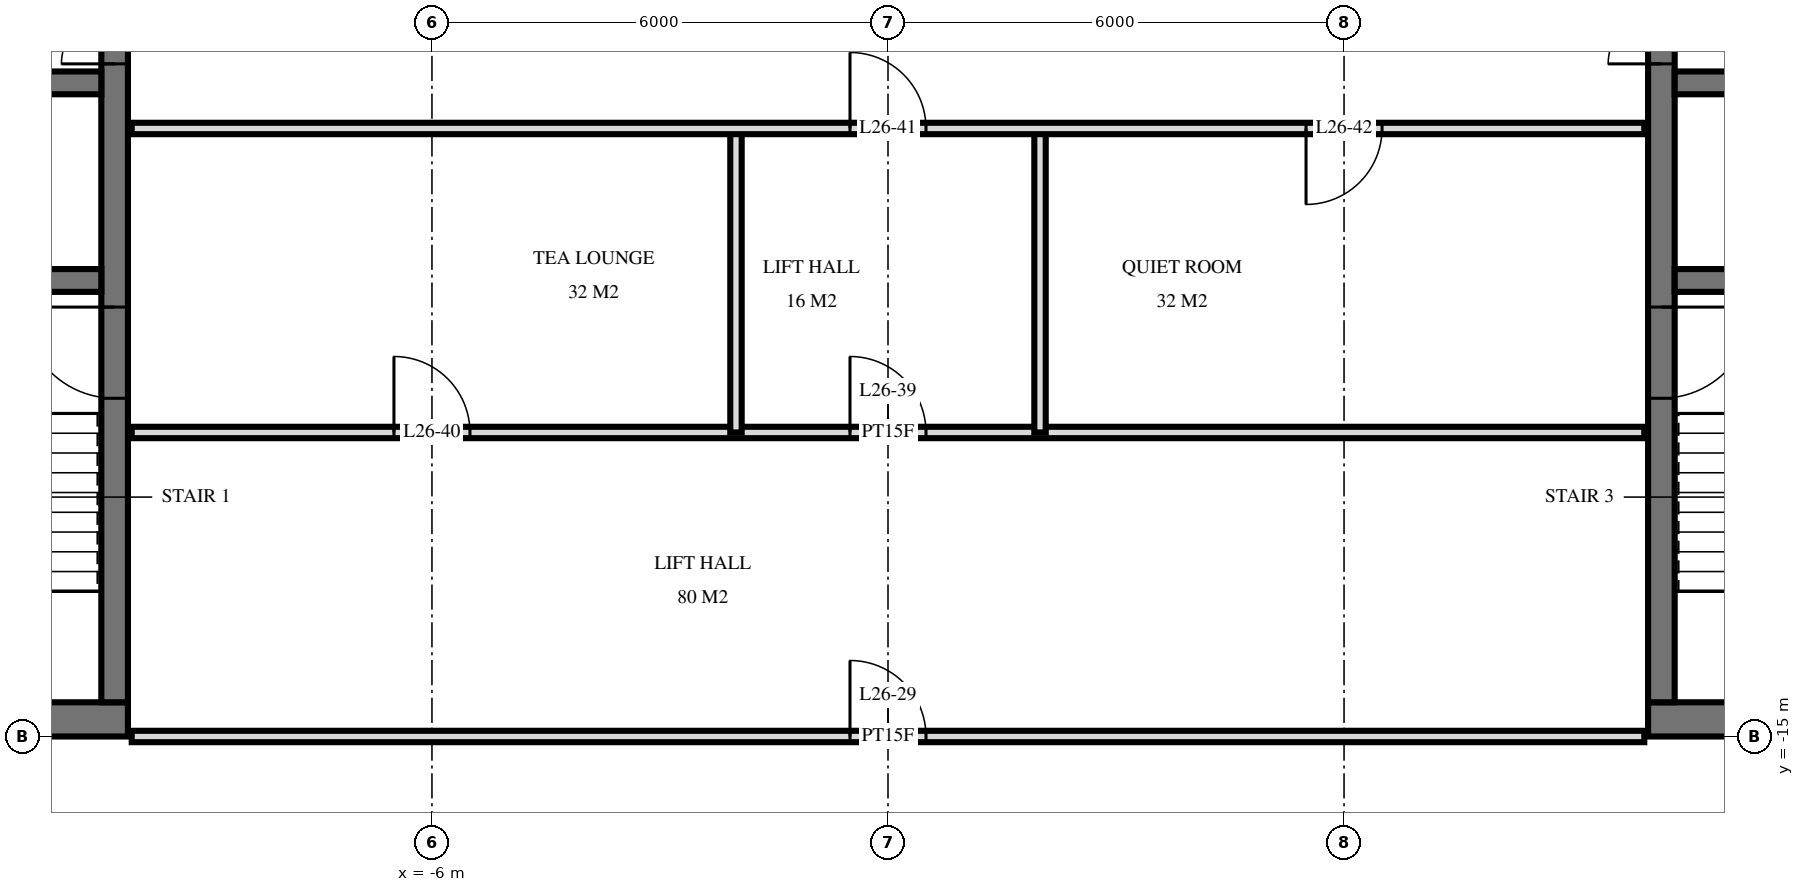
"""IFC4 building model, lengths in metres.
Left out: names, types, materials, properties, quantities, classifications, styles, units other than length and angle.
Written with IfcOpenShell. Run it as: python <this file> out.ifc"""

import sys

from ifc_helpers import new_model, si_unit, direction, frame, frame_2d, origin, place, context, subcontext, project, spatial, rectangle, extrude, element, fill, save


model = new_model("IFC4")
c1 = context("Model", 3, precision=1e-05, world=origin(), true_north=direction((0.0, 1.0)))
c2 = subcontext(c1, "Body", "Model", "MODEL_VIEW")
j1 = project(units=[si_unit("LENGTHUNIT", "METRE"), si_unit("PLANEANGLEUNIT", "RADIAN")], contexts=[c1])
p1 = place(None, origin())
s1 = spatial("IfcSite", under=j1, at=p1, CompositionType="ELEMENT")
p2 = place(p1, origin())
s2 = spatial("IfcBuilding", under=s1, at=p2, CompositionType="ELEMENT")
p3 = place(p2, frame((0.0, 0.0, 103.2)))
s3 = spatial("IfcBuildingStorey", under=s2, at=p3, CompositionType="ELEMENT", Elevation=103.2)
p4 = place(p3, frame((-29.5, -14.775, 0.0), z_axis=(0.0, 0.0, 1.0), x_axis=(1.0, 0.0, 0.0)))
e1 = element("IfcWall", 1, at=p4, inside=s3, PredefinedType="SHEAR", context=c2, shape_type="SweptSolid", body=[
    extrude(rectangle(XDim=19.5, YDim=0.45, at=frame_2d((9.75, 0.0))), origin(), (0.0, 0.0, 1.0), 3.6),
])
p5 = place(p4, frame((11.2, 0.0, 0.0)))
e2 = element("IfcOpeningElement", 2, at=p5, cuts=e1, PredefinedType="OPENING", context=c2, shape_type="SweptSolid", body=[
    extrude(rectangle(XDim=1.2, YDim=2.1, at=frame_2d((0.6, 1.05))), frame((0.0, 0.235, 0.0), z_axis=(0.0, -1.0, 0.0), x_axis=(1.0, 0.0, 0.0)), (0.0, 0.0, 1.0), 0.47),
])
p6 = place(p4, frame((14.25, 0.0, 0.0)))
e3 = element("IfcOpeningElement", 3, at=p6, cuts=e1, PredefinedType="OPENING", context=c2, shape_type="SweptSolid", body=[
    extrude(rectangle(XDim=1.1, YDim=2.1, at=frame_2d((0.55, 1.05))), frame((0.0, 0.235, 0.0), z_axis=(0.0, -1.0, 0.0), x_axis=(1.0, 0.0, 0.0)), (0.0, 0.0, 1.0), 0.47),
])
p7 = place(p4, frame((8.5, 0.0, 0.0)))
e4 = element("IfcOpeningElement", 4, at=p7, cuts=e1, PredefinedType="OPENING", context=c2, shape_type="SweptSolid", body=[
    extrude(rectangle(XDim=0.9, YDim=2.1, at=frame_2d((0.45, 1.05))), frame((0.0, 0.235, 0.0), z_axis=(0.0, -1.0, 0.0), x_axis=(1.0, 0.0, 0.0)), (0.0, 0.0, 1.0), 0.47),
])
p8 = place(p4, frame((6.05, 0.0, 0.0)))
e5 = element("IfcOpeningElement", 5, at=p8, cuts=e1, PredefinedType="OPENING", context=c2, shape_type="SweptSolid", body=[
    extrude(rectangle(XDim=1.0, YDim=2.1, at=frame_2d((0.5, 1.05))), frame((0.0, 0.235, 0.0), z_axis=(0.0, -1.0, 0.0), x_axis=(1.0, 0.0, 0.0)), (0.0, 0.0, 1.0), 0.47),
])
p9 = place(p4, frame((3.413, 0.0, 0.0)))
e6 = element("IfcOpeningElement", 6, at=p9, cuts=e1, PredefinedType="OPENING", context=c2, shape_type="SweptSolid", body=[
    extrude(rectangle(XDim=1.0, YDim=2.1, at=frame_2d((0.5, 1.05))), frame((0.0, 0.235, 0.0), z_axis=(0.0, -1.0, 0.0), x_axis=(1.0, 0.0, 0.0)), (0.0, 0.0, 1.0), 0.47),
])
p10 = place(p4, frame((1.087, 0.0, 0.0)))
e7 = element("IfcOpeningElement", 7, at=p10, cuts=e1, PredefinedType="OPENING", context=c2, shape_type="SweptSolid", body=[
    extrude(rectangle(XDim=1.0, YDim=2.1, at=frame_2d((0.5, 1.05))), frame((0.0, 0.235, 0.0), z_axis=(0.0, -1.0, 0.0), x_axis=(1.0, 0.0, 0.0)), (0.0, 0.0, 1.0), 0.47),
])
p11 = place(p3, frame((-10.175, -14.55, 0.0), z_axis=(0.0, 0.0, 1.0), x_axis=(0.0, 1.0, 0.0)))
e8 = element("IfcWall", 8, at=p11, inside=s3, PredefinedType="SHEAR", context=c2, shape_type="SweptSolid", body=[
    extrude(rectangle(XDim=14.1, YDim=0.35, at=frame_2d((7.05, 0.0))), origin(), (0.0, 0.0, 1.0), 3.6),
])
p12 = place(p11, frame((8.4, 0.0, 0.0)))
e9 = element("IfcOpeningElement", 9, at=p12, cuts=e8, PredefinedType="OPENING", context=c2, shape_type="SweptSolid", body=[
    extrude(rectangle(XDim=1.4, YDim=2.4, at=frame_2d((0.7, 1.2))), frame((0.0, 0.185, 0.0), z_axis=(0.0, -1.0, 0.0), x_axis=(1.0, 0.0, 0.0)), (0.0, 0.0, 1.0), 0.37),
])
p13 = place(p11, frame((10.0, 0.0, 0.0)))
e10 = element("IfcOpeningElement", 10, at=p13, cuts=e8, PredefinedType="OPENING", context=c2, shape_type="SweptSolid", body=[
    extrude(rectangle(XDim=1.4, YDim=2.4, at=frame_2d((0.7, 1.2))), frame((0.0, 0.185, 0.0), z_axis=(0.0, -1.0, 0.0), x_axis=(1.0, 0.0, 0.0)), (0.0, 0.0, 1.0), 0.37),
])
p14 = place(p11, frame((4.0, 0.0, 0.0)))
e11 = element("IfcOpeningElement", 11, at=p14, cuts=e8, PredefinedType="OPENING", context=c2, shape_type="SweptSolid", body=[
    extrude(rectangle(XDim=1.2, YDim=2.1, at=frame_2d((0.6, 1.05))), frame((0.0, 0.185, 0.0), z_axis=(0.0, -1.0, 0.0), x_axis=(1.0, 0.0, 0.0)), (0.0, 0.0, 1.0), 0.37),
])
p15 = place(p3, frame((-29.05, -6.4, 0.0), z_axis=(0.0, 0.0, 1.0), x_axis=(1.0, 0.0, 0.0)))
e12 = element("IfcWall", 12, at=p15, inside=s3, PredefinedType="SHEAR", context=c2, shape_type="SweptSolid", body=[
    extrude(rectangle(XDim=18.7, YDim=0.3, at=frame_2d((9.35, 0.0))), origin(), (0.0, 0.0, 1.0), 3.6),
])
p16 = place(p15, frame((2.95, 0.0, 0.0)))
e13 = element("IfcOpeningElement", 13, at=p16, cuts=e12, PredefinedType="OPENING", context=c2, shape_type="SweptSolid", body=[
    extrude(rectangle(XDim=1.1, YDim=2.1, at=frame_2d((0.55, 1.05))), frame((0.0, 0.16, 0.0), z_axis=(0.0, -1.0, 0.0), x_axis=(1.0, 0.0, 0.0)), (0.0, 0.0, 1.0), 0.32),
])
p17 = place(p15, frame((0.55, 0.0, 0.0)))
e14 = element("IfcOpeningElement", 14, at=p17, cuts=e12, PredefinedType="OPENING", context=c2, shape_type="SweptSolid", body=[
    extrude(rectangle(XDim=1.1, YDim=2.1, at=frame_2d((0.55, 1.05))), frame((0.0, 0.16, 0.0), z_axis=(0.0, -1.0, 0.0), x_axis=(1.0, 0.0, 0.0)), (0.0, 0.0, 1.0), 0.32),
])
p18 = place(p15, frame((10.8, 0.0, 0.0)))
e15 = element("IfcOpeningElement", 15, at=p18, cuts=e12, PredefinedType="OPENING", context=c2, shape_type="SweptSolid", body=[
    extrude(rectangle(XDim=1.1, YDim=2.1, at=frame_2d((0.55, 1.05))), frame((0.0, 0.16, 0.0), z_axis=(0.0, -1.0, 0.0), x_axis=(1.0, 0.0, 0.0)), (0.0, 0.0, 1.0), 0.32),
])
p19 = place(p3, frame((-29.05, -9.0, 0.0), z_axis=(0.0, 0.0, 1.0), x_axis=(1.0, 0.0, 0.0)))
e16 = element("IfcWall", 16, at=p19, inside=s3, PredefinedType="SHEAR", context=c2, shape_type="SweptSolid", body=[
    extrude(rectangle(XDim=18.7, YDim=0.3, at=frame_2d((9.35, 0.0))), origin(), (0.0, 0.0, 1.0), 3.6),
])
p20 = place(p19, frame((13.8, 0.0, 0.0)))
e17 = element("IfcOpeningElement", 17, at=p20, cuts=e16, PredefinedType="OPENING", context=c2, shape_type="SweptSolid", body=[
    extrude(rectangle(XDim=1.1, YDim=2.1, at=frame_2d((0.55, 1.05))), frame((0.0, 0.16, 0.0), z_axis=(0.0, -1.0, 0.0), x_axis=(1.0, 0.0, 0.0)), (0.0, 0.0, 1.0), 0.32),
])
p21 = place(p3, frame((10.0, -14.775, 0.0), z_axis=(0.0, 0.0, 1.0), x_axis=(1.0, 0.0, 0.0)))
e18 = element("IfcWall", 18, at=p21, inside=s3, PredefinedType="SHEAR", context=c2, shape_type="SweptSolid", body=[
    extrude(rectangle(XDim=19.5, YDim=0.45, at=frame_2d((9.75, 0.0))), origin(), (0.0, 0.0, 1.0), 3.6),
])
p22 = place(p21, frame((7.1, 0.0, 0.0)))
e19 = element("IfcOpeningElement", 19, at=p22, cuts=e18, PredefinedType="OPENING", context=c2, shape_type="SweptSolid", body=[
    extrude(rectangle(XDim=1.2, YDim=2.1, at=frame_2d((0.6, 1.05))), frame((0.0, 0.235, 0.0), z_axis=(0.0, -1.0, 0.0), x_axis=(1.0, 0.0, 0.0)), (0.0, 0.0, 1.0), 0.47),
])
p23 = place(p21, frame((4.15, 0.0, 0.0)))
e20 = element("IfcOpeningElement", 20, at=p23, cuts=e18, PredefinedType="OPENING", context=c2, shape_type="SweptSolid", body=[
    extrude(rectangle(XDim=1.1, YDim=2.1, at=frame_2d((0.55, 1.05))), frame((0.0, 0.235, 0.0), z_axis=(0.0, -1.0, 0.0), x_axis=(1.0, 0.0, 0.0)), (0.0, 0.0, 1.0), 0.47),
])
p24 = place(p21, frame((10.1, 0.0, 0.0)))
e21 = element("IfcOpeningElement", 21, at=p24, cuts=e18, PredefinedType="OPENING", context=c2, shape_type="SweptSolid", body=[
    extrude(rectangle(XDim=0.9, YDim=2.1, at=frame_2d((0.45, 1.05))), frame((0.0, 0.235, 0.0), z_axis=(0.0, -1.0, 0.0), x_axis=(1.0, 0.0, 0.0)), (0.0, 0.0, 1.0), 0.47),
])
p25 = place(p21, frame((12.45, 0.0, 0.0)))
e22 = element("IfcOpeningElement", 22, at=p25, cuts=e18, PredefinedType="OPENING", context=c2, shape_type="SweptSolid", body=[
    extrude(rectangle(XDim=1.0, YDim=2.1, at=frame_2d((0.5, 1.05))), frame((0.0, 0.235, 0.0), z_axis=(0.0, -1.0, 0.0), x_axis=(1.0, 0.0, 0.0)), (0.0, 0.0, 1.0), 0.47),
])
p26 = place(p21, frame((15.087, 0.0, 0.0)))
e23 = element("IfcOpeningElement", 23, at=p26, cuts=e18, PredefinedType="OPENING", context=c2, shape_type="SweptSolid", body=[
    extrude(rectangle(XDim=1.0, YDim=2.1, at=frame_2d((0.5, 1.05))), frame((0.0, 0.235, 0.0), z_axis=(0.0, -1.0, 0.0), x_axis=(1.0, 0.0, 0.0)), (0.0, 0.0, 1.0), 0.47),
])
p27 = place(p21, frame((17.413, 0.0, 0.0)))
e24 = element("IfcOpeningElement", 24, at=p27, cuts=e18, PredefinedType="OPENING", context=c2, shape_type="SweptSolid", body=[
    extrude(rectangle(XDim=1.0, YDim=2.1, at=frame_2d((0.5, 1.05))), frame((0.0, 0.235, 0.0), z_axis=(0.0, -1.0, 0.0), x_axis=(1.0, 0.0, 0.0)), (0.0, 0.0, 1.0), 0.47),
])
p28 = place(p3, frame((10.175, -14.55, 0.0), z_axis=(0.0, 0.0, 1.0), x_axis=(0.0, 1.0, 0.0)))
e25 = element("IfcWall", 25, at=p28, inside=s3, PredefinedType="SHEAR", context=c2, shape_type="SweptSolid", body=[
    extrude(rectangle(XDim=14.1, YDim=0.35, at=frame_2d((7.05, 0.0))), origin(), (0.0, 0.0, 1.0), 3.6),
])
p29 = place(p28, frame((8.4, 0.0, 0.0)))
e26 = element("IfcOpeningElement", 26, at=p29, cuts=e25, PredefinedType="OPENING", context=c2, shape_type="SweptSolid", body=[
    extrude(rectangle(XDim=1.4, YDim=2.4, at=frame_2d((0.7, 1.2))), frame((0.0, 0.185, 0.0), z_axis=(0.0, -1.0, 0.0), x_axis=(1.0, 0.0, 0.0)), (0.0, 0.0, 1.0), 0.37),
])
p30 = place(p28, frame((10.0, 0.0, 0.0)))
e27 = element("IfcOpeningElement", 27, at=p30, cuts=e25, PredefinedType="OPENING", context=c2, shape_type="SweptSolid", body=[
    extrude(rectangle(XDim=1.4, YDim=2.4, at=frame_2d((0.7, 1.2))), frame((0.0, 0.185, 0.0), z_axis=(0.0, -1.0, 0.0), x_axis=(1.0, 0.0, 0.0)), (0.0, 0.0, 1.0), 0.37),
])
p31 = place(p28, frame((4.0, 0.0, 0.0)))
e28 = element("IfcOpeningElement", 28, at=p31, cuts=e25, PredefinedType="OPENING", context=c2, shape_type="SweptSolid", body=[
    extrude(rectangle(XDim=1.2, YDim=2.1, at=frame_2d((0.6, 1.05))), frame((0.0, 0.185, 0.0), z_axis=(0.0, -1.0, 0.0), x_axis=(1.0, 0.0, 0.0)), (0.0, 0.0, 1.0), 0.37),
])
p32 = place(p3, frame((10.35, -6.4, 0.0), z_axis=(0.0, 0.0, 1.0), x_axis=(1.0, 0.0, 0.0)))
e29 = element("IfcWall", 29, at=p32, inside=s3, PredefinedType="SHEAR", context=c2, shape_type="SweptSolid", body=[
    extrude(rectangle(XDim=18.7, YDim=0.3, at=frame_2d((9.35, 0.0))), origin(), (0.0, 0.0, 1.0), 3.6),
])
p33 = place(p32, frame((14.65, 0.0, 0.0)))
e30 = element("IfcOpeningElement", 30, at=p33, cuts=e29, PredefinedType="OPENING", context=c2, shape_type="SweptSolid", body=[
    extrude(rectangle(XDim=1.1, YDim=2.1, at=frame_2d((0.55, 1.05))), frame((0.0, 0.16, 0.0), z_axis=(0.0, -1.0, 0.0), x_axis=(1.0, 0.0, 0.0)), (0.0, 0.0, 1.0), 0.32),
])
p34 = place(p32, frame((17.05, 0.0, 0.0)))
e31 = element("IfcOpeningElement", 31, at=p34, cuts=e29, PredefinedType="OPENING", context=c2, shape_type="SweptSolid", body=[
    extrude(rectangle(XDim=1.1, YDim=2.1, at=frame_2d((0.55, 1.05))), frame((0.0, 0.16, 0.0), z_axis=(0.0, -1.0, 0.0), x_axis=(1.0, 0.0, 0.0)), (0.0, 0.0, 1.0), 0.32),
])
p35 = place(p32, frame((6.8, 0.0, 0.0)))
e32 = element("IfcOpeningElement", 32, at=p35, cuts=e29, PredefinedType="OPENING", context=c2, shape_type="SweptSolid", body=[
    extrude(rectangle(XDim=1.1, YDim=2.1, at=frame_2d((0.55, 1.05))), frame((0.0, 0.16, 0.0), z_axis=(0.0, -1.0, 0.0), x_axis=(1.0, 0.0, 0.0)), (0.0, 0.0, 1.0), 0.32),
])
p36 = place(p3, frame((10.35, -9.0, 0.0), z_axis=(0.0, 0.0, 1.0), x_axis=(1.0, 0.0, 0.0)))
e33 = element("IfcWall", 33, at=p36, inside=s3, PredefinedType="SHEAR", context=c2, shape_type="SweptSolid", body=[
    extrude(rectangle(XDim=18.7, YDim=0.3, at=frame_2d((9.35, 0.0))), origin(), (0.0, 0.0, 1.0), 3.6),
])
p37 = place(p36, frame((3.8, 0.0, 0.0)))
e34 = element("IfcOpeningElement", 34, at=p37, cuts=e33, PredefinedType="OPENING", context=c2, shape_type="SweptSolid", body=[
    extrude(rectangle(XDim=1.1, YDim=2.1, at=frame_2d((0.55, 1.05))), frame((0.0, 0.16, 0.0), z_axis=(0.0, -1.0, 0.0), x_axis=(1.0, 0.0, 0.0)), (0.0, 0.0, 1.0), 0.32),
])
for number, where, z_axis, x_axis in (
    (35, (2.0, -11.0, 0.0), (0.0, 0.0, 1.0), (0.0, 1.0, 0.0)),
    (36, (-2.0, -11.0, 0.0), (0.0, 0.0, 1.0), (0.0, 1.0, 0.0)),
):
    element("IfcWall", number, at=place(p3, frame(where, z_axis=z_axis, x_axis=x_axis)), inside=s3, PredefinedType="PARTITIONING", context=c2, shape_type="SweptSolid", body=[
        extrude(rectangle(XDim=4.0, YDim=0.15, at=frame_2d((2.0, 0.0))), origin(), (0.0, 0.0, 1.0), 3.32),
    ])
p38 = place(p3, frame((-9.95, -15.0, 0.0), z_axis=(0.0, 0.0, 1.0), x_axis=(1.0, 0.0, 0.0)))
e37 = element("IfcWall", 37, at=p38, inside=s3, PredefinedType="PARTITIONING", context=c2, shape_type="SweptSolid", body=[
    extrude(rectangle(XDim=19.9, YDim=0.15, at=frame_2d((9.95, 0.0))), origin(), (0.0, 0.0, 1.0), 3.32),
])
p39 = place(p38, frame((9.45, 0.0, 0.0)))
e38 = element("IfcOpeningElement", 38, at=p39, cuts=e37, PredefinedType="OPENING", context=c2, shape_type="SweptSolid", body=[
    extrude(rectangle(XDim=1.0, YDim=2.1, at=frame_2d((0.5, 1.05))), frame((0.0, 0.085, 0.0), z_axis=(0.0, -1.0, 0.0), x_axis=(1.0, 0.0, 0.0)), (0.0, 0.0, 1.0), 0.17),
])
p40 = place(p3, frame((-9.95, -11.0, 0.0), z_axis=(0.0, 0.0, 1.0), x_axis=(1.0, 0.0, 0.0)))
e39 = element("IfcWall", 39, at=p40, inside=s3, PredefinedType="PARTITIONING", context=c2, shape_type="SweptSolid", body=[
    extrude(rectangle(XDim=19.9, YDim=0.15, at=frame_2d((9.95, 0.0))), origin(), (0.0, 0.0, 1.0), 3.32),
])
p41 = place(p40, frame((9.45, 0.0, 0.0)))
e40 = element("IfcOpeningElement", 40, at=p41, cuts=e39, PredefinedType="OPENING", context=c2, shape_type="SweptSolid", body=[
    extrude(rectangle(XDim=1.0, YDim=2.1, at=frame_2d((0.5, 1.05))), frame((0.0, 0.085, 0.0), z_axis=(0.0, -1.0, 0.0), x_axis=(1.0, 0.0, 0.0)), (0.0, 0.0, 1.0), 0.17),
])
p42 = place(p40, frame((3.45, 0.0, 0.0)))
e41 = element("IfcOpeningElement", 41, at=p42, cuts=e39, PredefinedType="OPENING", context=c2, shape_type="SweptSolid", body=[
    extrude(rectangle(XDim=1.0, YDim=2.1, at=frame_2d((0.5, 1.05))), frame((0.0, 0.085, 0.0), z_axis=(0.0, -1.0, 0.0), x_axis=(1.0, 0.0, 0.0)), (0.0, 0.0, 1.0), 0.17),
])
p43 = place(p3, frame((-9.95, -7.0, 0.0), z_axis=(0.0, 0.0, 1.0), x_axis=(1.0, 0.0, 0.0)))
e42 = element("IfcWall", 42, at=p43, inside=s3, PredefinedType="PARTITIONING", context=c2, shape_type="SweptSolid", body=[
    extrude(rectangle(XDim=19.9, YDim=0.15, at=frame_2d((9.95, 0.0))), origin(), (0.0, 0.0, 1.0), 3.32),
])
p44 = place(p43, frame((9.45, 0.0, 0.0)))
e43 = element("IfcOpeningElement", 43, at=p44, cuts=e42, PredefinedType="OPENING", context=c2, shape_type="SweptSolid", body=[
    extrude(rectangle(XDim=1.0, YDim=2.1, at=frame_2d((0.5, 1.05))), frame((0.0, 0.085, 0.0), z_axis=(0.0, -1.0, 0.0), x_axis=(1.0, 0.0, 0.0)), (0.0, 0.0, 1.0), 0.17),
])
p45 = place(p43, frame((15.45, 0.0, 0.0)))
e44 = element("IfcOpeningElement", 44, at=p45, cuts=e42, PredefinedType="OPENING", context=c2, shape_type="SweptSolid", body=[
    extrude(rectangle(XDim=1.0, YDim=2.1, at=frame_2d((0.5, 1.05))), frame((0.0, 0.085, 0.0), z_axis=(0.0, -1.0, 0.0), x_axis=(1.0, 0.0, 0.0)), (0.0, 0.0, 1.0), 0.17),
])
p46 = place(p12, origin())
e45 = element("IfcDoor", 45, at=p46, inside=s3, OperationType="DOUBLE_DOOR_SINGLE_SWING", PredefinedType="DOOR", context=c2, shape_type="SweptSolid", body=[
    extrude(rectangle(XDim=1.4, YDim=2.4, at=frame_2d((0.7, 1.2))), frame((0.0, 0.025, 0.0), z_axis=(0.0, -1.0, 0.0), x_axis=(1.0, 0.0, 0.0)), (0.0, 0.0, 1.0), 0.05),
])
fill(e9, e45)
p47 = place(p14, origin())
e46 = element("IfcDoor", 46, at=p47, inside=s3, OperationType="SINGLE_SWING_LEFT", PredefinedType="DOOR", context=c2, shape_type="SweptSolid", body=[
    extrude(rectangle(XDim=1.2, YDim=2.1, at=frame_2d((0.6, 1.05))), frame((0.0, 0.025, 0.0), z_axis=(0.0, -1.0, 0.0), x_axis=(1.0, 0.0, 0.0)), (0.0, 0.0, 1.0), 0.05),
])
fill(e11, e46)
p48 = place(p29, origin())
e47 = element("IfcDoor", 47, at=p48, inside=s3, OperationType="DOUBLE_DOOR_SINGLE_SWING", PredefinedType="DOOR", context=c2, shape_type="SweptSolid", body=[
    extrude(rectangle(XDim=1.4, YDim=2.4, at=frame_2d((0.7, 1.2))), frame((0.0, 0.025, 0.0), z_axis=(0.0, -1.0, 0.0), x_axis=(1.0, 0.0, 0.0)), (0.0, 0.0, 1.0), 0.05),
])
fill(e26, e47)
p49 = place(p31, frame((0.6, 0.0, 0.0), z_axis=(0.0, 0.0, 1.0), x_axis=(-1.0, 0.0, 0.0)))
e48 = element("IfcDoor", 48, at=p49, inside=s3, OperationType="SINGLE_SWING_RIGHT", PredefinedType="DOOR", context=c2, shape_type="SweptSolid", body=[
    extrude(rectangle(XDim=1.2, YDim=2.1, at=frame_2d((0.0, 1.05))), frame((0.0, -0.025, 0.0), z_axis=(0.0, 1.0, 0.0), x_axis=(-1.0, 0.0, 0.0)), (0.0, 0.0, 1.0), 0.05),
])
fill(e28, e48)
p50 = place(p39, origin())
e49 = element("IfcDoor", 49, at=p50, inside=s3, OperationType="SINGLE_SWING_RIGHT", PredefinedType="DOOR", context=c2, shape_type="SweptSolid", body=[
    extrude(rectangle(XDim=1.0, YDim=2.1, at=frame_2d((0.5, 1.05))), frame((0.0, 0.025, 0.0), z_axis=(0.0, -1.0, 0.0), x_axis=(1.0, 0.0, 0.0)), (0.0, 0.0, 1.0), 0.05),
])
fill(e38, e49)
p51 = place(p41, origin())
e50 = element("IfcDoor", 50, at=p51, inside=s3, OperationType="SINGLE_SWING_RIGHT", PredefinedType="DOOR", context=c2, shape_type="SweptSolid", body=[
    extrude(rectangle(XDim=1.0, YDim=2.1, at=frame_2d((0.5, 1.05))), frame((0.0, 0.025, 0.0), z_axis=(0.0, -1.0, 0.0), x_axis=(1.0, 0.0, 0.0)), (0.0, 0.0, 1.0), 0.05),
])
fill(e40, e50)
p52 = place(p42, origin())
e51 = element("IfcDoor", 51, at=p52, inside=s3, OperationType="SINGLE_SWING_RIGHT", PredefinedType="DOOR", context=c2, shape_type="SweptSolid", body=[
    extrude(rectangle(XDim=1.0, YDim=2.1, at=frame_2d((0.5, 1.05))), frame((0.0, 0.025, 0.0), z_axis=(0.0, -1.0, 0.0), x_axis=(1.0, 0.0, 0.0)), (0.0, 0.0, 1.0), 0.05),
])
fill(e41, e51)
p53 = place(p44, origin())
e52 = element("IfcDoor", 52, at=p53, inside=s3, OperationType="SINGLE_SWING_RIGHT", PredefinedType="DOOR", context=c2, shape_type="SweptSolid", body=[
    extrude(rectangle(XDim=1.0, YDim=2.1, at=frame_2d((0.5, 1.05))), frame((0.0, 0.025, 0.0), z_axis=(0.0, -1.0, 0.0), x_axis=(1.0, 0.0, 0.0)), (0.0, 0.0, 1.0), 0.05),
])
fill(e43, e52)
p54 = place(p45, frame((0.5, 0.0, 0.0), z_axis=(0.0, 0.0, 1.0), x_axis=(-1.0, 0.0, 0.0)))
e53 = element("IfcDoor", 53, at=p54, inside=s3, OperationType="SINGLE_SWING_LEFT", PredefinedType="DOOR", context=c2, shape_type="SweptSolid", body=[
    extrude(rectangle(XDim=1.0, YDim=2.1, at=frame_2d((0.0, 1.05))), frame((0.0, -0.025, 0.0), z_axis=(0.0, 1.0, 0.0), x_axis=(-1.0, 0.0, 0.0)), (0.0, 0.0, 1.0), 0.05),
])
fill(e44, e53)
save(model, sys.argv[1])
